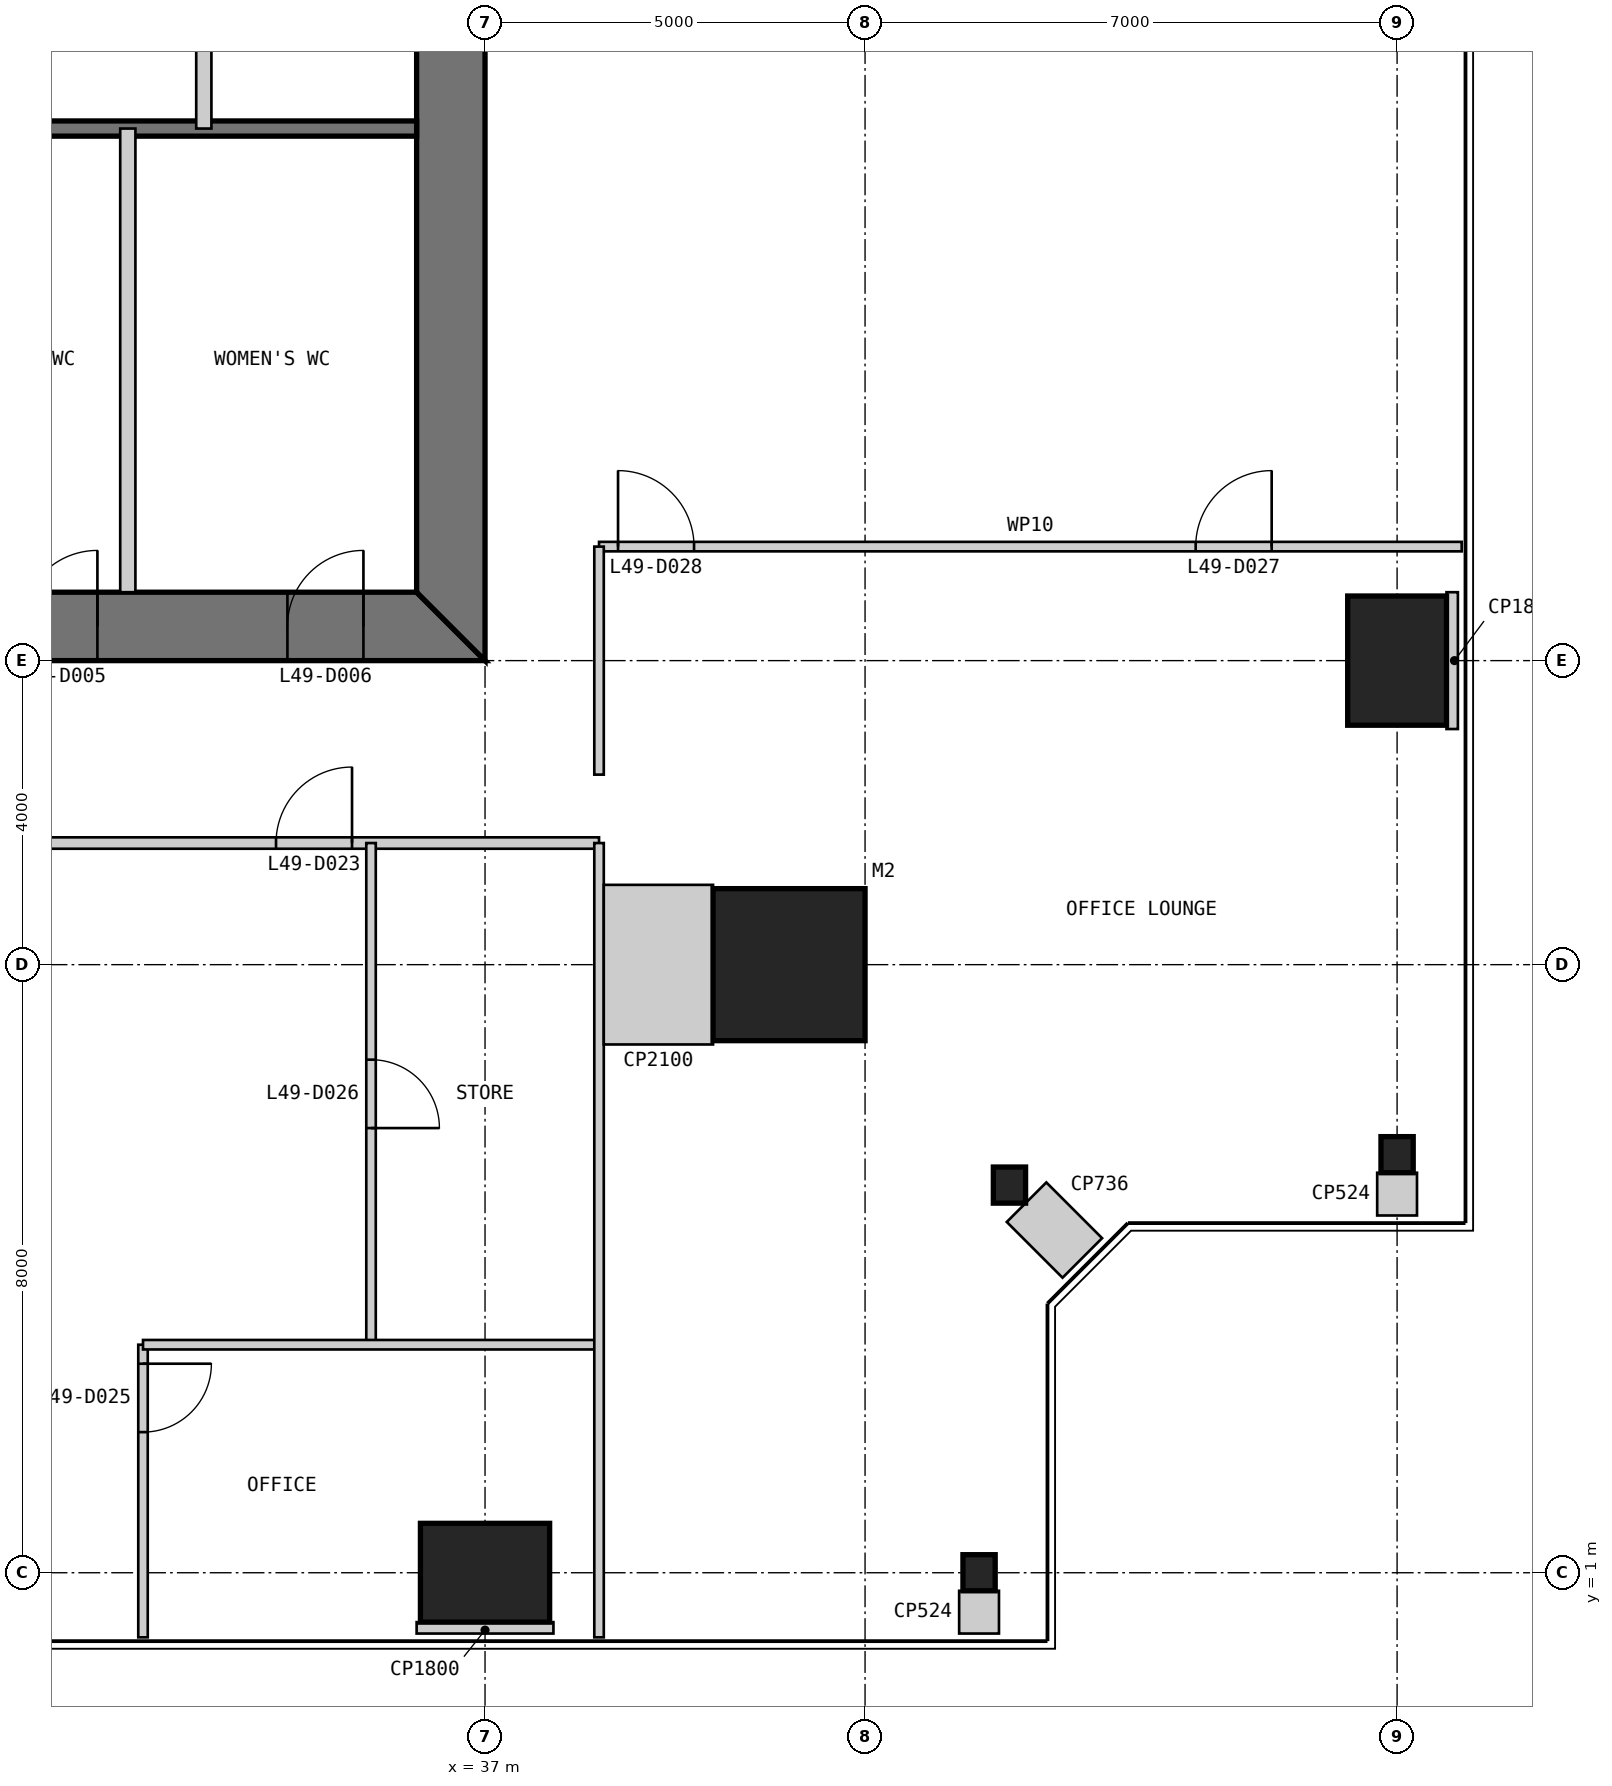
"""IFC4 building model, lengths in metres.
Left out: names, types, materials, properties, quantities, classifications, styles, units other than length and angle.
Written with IfcOpenShell. Run it as: python <this file> out.ifc"""

import sys

from ifc_helpers import new_model, si_unit, direction, frame, frame_2d, origin, origin_2d, place, context, subcontext, project, spatial, polyline, rectangle, i_section, outline, extrude, element, fill, save


model = new_model("IFC4")
c1 = context("Model", 3, precision=1e-05, world=origin(), true_north=direction((0.0, 1.0)))
c2 = subcontext(c1, "Body", "Model", "MODEL_VIEW")
j1 = project(units=[si_unit("LENGTHUNIT", "METRE"), si_unit("PLANEANGLEUNIT", "RADIAN")], contexts=[c1])
p1 = place(None, origin())
s1 = spatial("IfcSite", under=j1, at=p1, CompositionType="ELEMENT")
p2 = place(p1, origin())
s2 = spatial("IfcBuilding", under=s1, at=p2, CompositionType="ELEMENT")
p3 = place(p2, frame((0.0, 0.0, 209.8)))
s3 = spatial("IfcBuildingStorey", under=s2, at=p3, CompositionType="ELEMENT", Elevation=209.8)
p4 = place(p3, frame((41.0, 9.0, 0.0), z_axis=(0.0, 0.0, 1.0), x_axis=(1.0, 0.0, 0.0)))
e1 = element("IfcColumn", 1, at=p4, inside=s3, PredefinedType="COLUMN", context=c2, shape_type="SweptSolid", body=[
    extrude(rectangle(XDim=2.0, YDim=2.0, at=origin_2d()), origin(), (0.0, 0.0, 1.0), 4.0),
])
p5 = place(p3, frame((37.0, 1.0, 0.0), z_axis=(0.0, 0.0, 1.0), x_axis=(1.0, 0.0, 0.0)))
e2 = element("IfcColumn", 2, at=p5, inside=s3, PredefinedType="COLUMN", context=c2, shape_type="SweptSolid", body=[
    extrude(rectangle(XDim=1.7, YDim=1.3, at=origin_2d()), origin(), (0.0, 0.0, 1.0), 4.0),
])
for number, where, z_axis, x_axis in (
    (3, (43.5, 1.0, 0.0), (0.0, 0.0, 1.0), (1.0, 0.0, 0.0)),
    (4, (43.9, 6.1, 0.0), (0.0, 0.0, 1.0), (1.0, 0.0, 0.0)),
    (5, (49.0, 6.5, 0.0), (0.0, 0.0, 1.0), (1.0, 0.0, 0.0)),
):
    element("IfcColumn", number, at=place(p3, frame(where, z_axis=z_axis, x_axis=x_axis)), inside=s3, PredefinedType="COLUMN", context=c2, shape_type="SweptSolid", body=[
        extrude(i_section(OverallWidth=0.424, OverallDepth=0.475, WebThickness=0.048, FlangeThickness=0.077, at=origin_2d()), origin(), (0.0, 0.0, 1.0), 4.0),
    ])
p6 = place(p3, frame((49.0, 13.0, 0.0), z_axis=(0.0, 0.0, 1.0), x_axis=(1.0, 0.0, 0.0)))
e6 = element("IfcColumn", 6, at=p6, inside=s3, PredefinedType="COLUMN", context=c2, shape_type="SweptSolid", body=[
    extrude(rectangle(XDim=1.3, YDim=1.7, at=origin_2d()), origin(), (0.0, 0.0, 1.0), 4.0),
])
p7 = place(p3, frame((13.0, 13.45, 0.0), z_axis=(0.0, 0.0, 1.0), x_axis=(1.0, 0.0, 0.0)))
e7 = element("IfcWall", 7, at=p7, inside=s3, PredefinedType="SHEAR", context=c2, shape_type="SweptSolid", body=[
    extrude(outline(polyline([(0.0, -0.45), (24.0, -0.45), (23.1, 0.45), (0.9, 0.45), (0.0, -0.45)])), origin(), (0.0, 0.0, 1.0), 4.0),
])
p8 = place(p7, frame((4.9, 0.0, 0.0)))
e8 = element("IfcOpeningElement", 8, at=p8, cuts=e7, PredefinedType="OPENING", context=c2, shape_type="SweptSolid", body=[
    extrude(rectangle(XDim=1.0, YDim=2.2, at=frame_2d((0.5, 1.1))), frame((0.0, 0.46, 0.0), z_axis=(0.0, -1.0, 0.0), x_axis=(1.0, 0.0, 0.0)), (0.0, 0.0, 1.0), 0.92),
])
p9 = place(p7, frame((8.9, 0.0, 0.0)))
e9 = element("IfcOpeningElement", 9, at=p9, cuts=e7, PredefinedType="OPENING", context=c2, shape_type="SweptSolid", body=[
    extrude(rectangle(XDim=1.1, YDim=2.2, at=frame_2d((0.55, 1.1))), frame((0.0, 0.46, 0.0), z_axis=(0.0, -1.0, 0.0), x_axis=(1.0, 0.0, 0.0)), (0.0, 0.0, 1.0), 0.92),
])
p10 = place(p7, frame((15.05, 0.0, 0.0)))
e10 = element("IfcOpeningElement", 10, at=p10, cuts=e7, PredefinedType="OPENING", context=c2, shape_type="SweptSolid", body=[
    extrude(rectangle(XDim=0.9, YDim=2.2, at=frame_2d((0.45, 1.1))), frame((0.0, 0.46, 0.0), z_axis=(0.0, -1.0, 0.0), x_axis=(1.0, 0.0, 0.0)), (0.0, 0.0, 1.0), 0.92),
])
p11 = place(p7, frame((17.9, 0.0, 0.0)))
e11 = element("IfcOpeningElement", 11, at=p11, cuts=e7, PredefinedType="OPENING", context=c2, shape_type="SweptSolid", body=[
    extrude(rectangle(XDim=1.0, YDim=2.2, at=frame_2d((0.5, 1.1))), frame((0.0, 0.46, 0.0), z_axis=(0.0, -1.0, 0.0), x_axis=(1.0, 0.0, 0.0)), (0.0, 0.0, 1.0), 0.92),
])
p12 = place(p7, frame((21.4, 0.0, 0.0)))
e12 = element("IfcOpeningElement", 12, at=p12, cuts=e7, PredefinedType="OPENING", context=c2, shape_type="SweptSolid", body=[
    extrude(rectangle(XDim=1.0, YDim=2.2, at=frame_2d((0.5, 1.1))), frame((0.0, 0.46, 0.0), z_axis=(0.0, -1.0, 0.0), x_axis=(1.0, 0.0, 0.0)), (0.0, 0.0, 1.0), 0.92),
])
p13 = place(p3, frame((36.55, 13.9, 0.0), z_axis=(0.0, 0.0, 1.0), x_axis=(0.0, 1.0, 0.0)))
e13 = element("IfcWall", 13, at=p13, inside=s3, PredefinedType="SHEAR", context=c2, shape_type="SweptSolid", body=[
    extrude(outline(polyline([(-0.9, -0.45), (23.1, -0.45), (22.2, 0.45), (0.0, 0.45), (-0.9, -0.45)])), origin(), (0.0, 0.0, 1.0), 4.0),
])
p14 = place(p13, frame((20.2, 0.0, 0.0)))
e14 = element("IfcOpeningElement", 14, at=p14, cuts=e13, PredefinedType="OPENING", context=c2, shape_type="SweptSolid", body=[
    extrude(rectangle(XDim=1.0, YDim=2.2, at=frame_2d((0.5, 1.1))), frame((0.0, 0.46, 0.0), z_axis=(0.0, -1.0, 0.0), x_axis=(1.0, 0.0, 0.0)), (0.0, 0.0, 1.0), 0.92),
])
p15 = place(p13, frame((17.25, 0.0, 0.0)))
e15 = element("IfcOpeningElement", 15, at=p15, cuts=e13, PredefinedType="OPENING", context=c2, shape_type="SweptSolid", body=[
    extrude(rectangle(XDim=0.9, YDim=2.2, at=frame_2d((0.45, 1.1))), frame((0.0, 0.46, 0.0), z_axis=(0.0, -1.0, 0.0), x_axis=(1.0, 0.0, 0.0)), (0.0, 0.0, 1.0), 0.92),
])
p16 = place(p3, frame((20.3, 20.0, 0.0), z_axis=(0.0, 0.0, 1.0), x_axis=(1.0, 0.0, 0.0)))
e16 = element("IfcWall", 16, at=p16, inside=s3, PredefinedType="SOLIDWALL", context=c2, shape_type="SweptSolid", body=[
    extrude(rectangle(XDim=15.8, YDim=0.2, at=frame_2d((7.9, 0.0))), origin(), (0.0, 0.0, 1.0), 3.8),
])
p17 = place(p3, frame((32.3, 13.9, 0.0), z_axis=(0.0, 0.0, 1.0), x_axis=(0.0, 1.0, 0.0)))
e17 = element("IfcWall", 17, at=p17, inside=s3, PredefinedType="PARTITIONING", context=c2, shape_type="SweptSolid", body=[
    extrude(rectangle(XDim=6.1, YDim=0.2, at=frame_2d((3.05, 0.0))), origin(), (0.0, 0.0, 1.0), 3.8),
])
p18 = place(p3, frame((33.3, 36.1, 0.0), z_axis=(0.0, 0.0, 1.0), x_axis=(0.0, -1.0, 0.0)))
e18 = element("IfcWall", 18, at=p18, inside=s3, PredefinedType="PARTITIONING", context=c2, shape_type="SweptSolid", body=[
    extrude(rectangle(XDim=16.1, YDim=0.2, at=frame_2d((8.05, 0.0))), origin(), (0.0, 0.0, 1.0), 3.8),
])
p19 = place(p3, frame((11.5, 10.6, 0.0), z_axis=(0.0, 0.0, 1.0), x_axis=(1.0, 0.0, 0.0)))
e19 = element("IfcWall", 19, at=p19, inside=s3, PredefinedType="PARTITIONING", context=c2, shape_type="SweptSolid", body=[
    extrude(rectangle(XDim=27.0, YDim=0.15, at=frame_2d((13.5, 0.0))), origin(), (0.0, 0.0, 1.0), 3.85),
])
p20 = place(p19, frame((0.25, 0.0, 0.0)))
e20 = element("IfcOpeningElement", 20, at=p20, cuts=e19, PredefinedType="OPENING", context=c2, shape_type="SweptSolid", body=[
    extrude(rectangle(XDim=1.0, YDim=2.2, at=frame_2d((0.5, 1.1))), frame((0.0, 0.085, 0.0), z_axis=(0.0, -1.0, 0.0), x_axis=(1.0, 0.0, 0.0)), (0.0, 0.0, 1.0), 0.17),
])
p21 = place(p19, frame((22.75, 0.0, 0.0)))
e21 = element("IfcOpeningElement", 21, at=p21, cuts=e19, PredefinedType="OPENING", context=c2, shape_type="SweptSolid", body=[
    extrude(rectangle(XDim=1.0, YDim=2.2, at=frame_2d((0.5, 1.1))), frame((0.0, 0.085, 0.0), z_axis=(0.0, -1.0, 0.0), x_axis=(1.0, 0.0, 0.0)), (0.0, 0.0, 1.0), 0.17),
])
p22 = place(p3, frame((32.5, 0.15, 0.0), z_axis=(0.0, 0.0, 1.0), x_axis=(0.0, 1.0, 0.0)))
e22 = element("IfcWall", 22, at=p22, inside=s3, PredefinedType="PARTITIONING", context=c2, shape_type="SweptSolid", body=[
    extrude(rectangle(XDim=3.85, YDim=0.125, at=frame_2d((1.925, 0.0))), origin(), (0.0, 0.0, 1.0), 3.85),
])
p23 = place(p22, frame((2.7, 0.0, 0.0)))
e23 = element("IfcOpeningElement", 23, at=p23, cuts=e22, PredefinedType="OPENING", context=c2, shape_type="SweptSolid", body=[
    extrude(rectangle(XDim=0.9, YDim=2.2, at=frame_2d((0.45, 1.1))), frame((0.0, 0.073, 0.0), z_axis=(0.0, -1.0, 0.0), x_axis=(1.0, 0.0, 0.0)), (0.0, 0.0, 1.0), 0.145),
])
p24 = place(p3, frame((35.5, 4.0, 0.0), z_axis=(0.0, 0.0, 1.0), x_axis=(0.0, 1.0, 0.0)))
e24 = element("IfcWall", 24, at=p24, inside=s3, PredefinedType="PARTITIONING", context=c2, shape_type="SweptSolid", body=[
    extrude(rectangle(XDim=6.6, YDim=0.125, at=frame_2d((3.3, 0.0))), origin(), (0.0, 0.0, 1.0), 3.85),
])
p25 = place(p24, frame((2.85, 0.0, 0.0)))
e25 = element("IfcOpeningElement", 25, at=p25, cuts=e24, PredefinedType="OPENING", context=c2, shape_type="SweptSolid", body=[
    extrude(rectangle(XDim=0.9, YDim=2.2, at=frame_2d((0.45, 1.1))), frame((0.0, 0.073, 0.0), z_axis=(0.0, -1.0, 0.0), x_axis=(1.0, 0.0, 0.0)), (0.0, 0.0, 1.0), 0.145),
])
p26 = place(p3, frame((32.5, 4.0, 0.0), z_axis=(0.0, 0.0, 1.0), x_axis=(1.0, 0.0, 0.0)))
e26 = element("IfcWall", 26, at=p26, inside=s3, PredefinedType="PARTITIONING", context=c2, shape_type="SweptSolid", body=[
    extrude(rectangle(XDim=6.0, YDim=0.125, at=frame_2d((3.0, 0.0))), origin(), (0.0, 0.0, 1.0), 3.85),
])
p27 = place(p3, frame((38.5, 0.15, 0.0), z_axis=(0.0, 0.0, 1.0), x_axis=(0.0, 1.0, 0.0)))
e27 = element("IfcWall", 27, at=p27, inside=s3, PredefinedType="PARTITIONING", context=c2, shape_type="SweptSolid", body=[
    extrude(rectangle(XDim=10.45, YDim=0.125, at=frame_2d((5.225, 0.0))), origin(), (0.0, 0.0, 1.0), 3.85),
])
p28 = place(p3, frame((49.85, 14.5, 0.0), z_axis=(0.0, 0.0, 1.0), x_axis=(-1.0, 0.0, 0.0)))
e28 = element("IfcWall", 28, at=p28, inside=s3, PredefinedType="PARTITIONING", context=c2, shape_type="SweptSolid", body=[
    extrude(rectangle(XDim=11.35, YDim=0.125, at=frame_2d((5.675, 0.0))), origin(), (0.0, 0.0, 1.0), 3.85),
])
p29 = place(p28, frame((2.5, 0.0, 0.0)))
e29 = element("IfcOpeningElement", 29, at=p29, cuts=e28, PredefinedType="OPENING", context=c2, shape_type="SweptSolid", body=[
    extrude(rectangle(XDim=1.0, YDim=2.2, at=frame_2d((0.5, 1.1))), frame((0.0, 0.073, 0.0), z_axis=(0.0, -1.0, 0.0), x_axis=(1.0, 0.0, 0.0)), (0.0, 0.0, 1.0), 0.145),
])
p30 = place(p28, frame((10.1, 0.0, 0.0)))
e30 = element("IfcOpeningElement", 30, at=p30, cuts=e28, PredefinedType="OPENING", context=c2, shape_type="SweptSolid", body=[
    extrude(rectangle(XDim=1.0, YDim=2.2, at=frame_2d((0.5, 1.1))), frame((0.0, 0.073, 0.0), z_axis=(0.0, -1.0, 0.0), x_axis=(1.0, 0.0, 0.0)), (0.0, 0.0, 1.0), 0.145),
])
p31 = place(p3, frame((38.5, 11.5, 0.0), z_axis=(0.0, 0.0, 1.0), x_axis=(0.0, 1.0, 0.0)))
e31 = element("IfcWall", 31, at=p31, inside=s3, PredefinedType="PARTITIONING", context=c2, shape_type="SweptSolid", body=[
    extrude(rectangle(XDim=3.0, YDim=0.125, at=frame_2d((1.5, 0.0))), origin(), (0.0, 0.0, 1.0), 3.85),
])
p32 = place(p3, frame((37.0, 0.2, 0.0), z_axis=(0.0, 0.0, 1.0), x_axis=(0.0, 1.0, 0.0)))
e32 = element("IfcWall", 32, at=p32, inside=s3, PredefinedType="PARTITIONING", context=c2, shape_type="SweptSolid", body=[
    extrude(rectangle(XDim=0.15, YDim=1.8, at=frame_2d((0.075, 0.0))), origin(), (0.0, 0.0, 1.0), 3.85),
])
p33 = place(p3, frame((38.562, 9.0, 0.0), z_axis=(0.0, 0.0, 1.0), x_axis=(1.0, 0.0, 0.0)))
e33 = element("IfcWall", 33, at=p33, inside=s3, PredefinedType="PARTITIONING", context=c2, shape_type="SweptSolid", body=[
    extrude(rectangle(XDim=1.438, YDim=2.1, at=frame_2d((0.719, 0.0))), origin(), (0.0, 0.0, 1.0), 3.85),
])
p34 = place(p3, frame((43.5, 0.2, 0.0), z_axis=(0.0, 0.0, 1.0), x_axis=(0.0, 1.0, 0.0)))
e34 = element("IfcWall", 34, at=p34, inside=s3, PredefinedType="PARTITIONING", context=c2, shape_type="SweptSolid", body=[
    extrude(rectangle(XDim=0.562, YDim=0.524, at=frame_2d((0.281, 0.0))), origin(), (0.0, 0.0, 1.0), 3.85),
])
p35 = place(p3, frame((44.859, 5.141, 0.0), z_axis=(0.0, 0.0, 1.0), x_axis=(-0.707106781187, 0.707106781187, 0.0)))
e35 = element("IfcWall", 35, at=p35, inside=s3, PredefinedType="PARTITIONING", context=c2, shape_type="SweptSolid", body=[
    extrude(rectangle(XDim=1.038, YDim=0.736, at=frame_2d((0.519, 0.0))), origin(), (0.0, 0.0, 1.0), 3.85),
])
p36 = place(p3, frame((49.0, 5.7, 0.0), z_axis=(0.0, 0.0, 1.0), x_axis=(0.0, 1.0, 0.0)))
e36 = element("IfcWall", 36, at=p36, inside=s3, PredefinedType="PARTITIONING", context=c2, shape_type="SweptSolid", body=[
    extrude(rectangle(XDim=0.562, YDim=0.524, at=frame_2d((0.281, 0.0))), origin(), (0.0, 0.0, 1.0), 3.85),
])
p37 = place(p3, frame((49.8, 13.0, 0.0), z_axis=(0.0, 0.0, 1.0), x_axis=(-1.0, 0.0, 0.0)))
e37 = element("IfcWall", 37, at=p37, inside=s3, PredefinedType="PARTITIONING", context=c2, shape_type="SweptSolid", body=[
    extrude(rectangle(XDim=0.15, YDim=1.8, at=frame_2d((0.075, 0.0))), origin(), (0.0, 0.0, 1.0), 3.85),
])
p38 = place(p11, origin())
e38 = element("IfcDoor", 38, at=p38, inside=s3, OperationType="SINGLE_SWING_RIGHT", PredefinedType="DOOR", context=c2, shape_type="SweptSolid", body=[
    extrude(rectangle(XDim=1.0, YDim=2.2, at=frame_2d((0.5, 1.1))), frame((0.0, 0.025, 0.0), z_axis=(0.0, -1.0, 0.0), x_axis=(1.0, 0.0, 0.0)), (0.0, 0.0, 1.0), 0.05),
    extrude(outline(polyline([(0.0, 0.0), (0.04, 0.0), (0.04, 2.16), (0.96, 2.16), (0.96, 0.0), (1.0, 0.0), (1.0, 2.2), (0.0, 2.2), (0.0, 0.0)])), frame((0.0, 0.3, 0.0), z_axis=(0.0, -1.0, 0.0), x_axis=(1.0, 0.0, 0.0)), (0.0, 0.0, 1.0), 0.6),
])
fill(e11, e38)
p39 = place(p12, origin())
e39 = element("IfcDoor", 39, at=p39, inside=s3, OperationType="SINGLE_SWING_RIGHT", PredefinedType="DOOR", context=c2, shape_type="SweptSolid", body=[
    extrude(rectangle(XDim=1.0, YDim=2.2, at=frame_2d((0.5, 1.1))), frame((0.0, 0.025, 0.0), z_axis=(0.0, -1.0, 0.0), x_axis=(1.0, 0.0, 0.0)), (0.0, 0.0, 1.0), 0.05),
    extrude(outline(polyline([(0.0, 0.0), (0.04, 0.0), (0.04, 2.16), (0.96, 2.16), (0.96, 0.0), (1.0, 0.0), (1.0, 2.2), (0.0, 2.2), (0.0, 0.0)])), frame((0.0, 0.3, 0.0), z_axis=(0.0, -1.0, 0.0), x_axis=(1.0, 0.0, 0.0)), (0.0, 0.0, 1.0), 0.6),
])
fill(e12, e39)
p40 = place(p21, origin())
e40 = element("IfcDoor", 40, at=p40, inside=s3, OperationType="SINGLE_SWING_RIGHT", PredefinedType="DOOR", context=c2, shape_type="SweptSolid", body=[
    extrude(rectangle(XDim=1.0, YDim=2.2, at=frame_2d((0.5, 1.1))), frame((0.0, 0.025, 0.0), z_axis=(0.0, -1.0, 0.0), x_axis=(1.0, 0.0, 0.0)), (0.0, 0.0, 1.0), 0.05),
])
fill(e21, e40)
p41 = place(p23, frame((0.9, 0.0, 0.0), z_axis=(0.0, 0.0, 1.0), x_axis=(-1.0, 0.0, 0.0)))
e41 = element("IfcDoor", 41, at=p41, inside=s3, OperationType="SINGLE_SWING_LEFT", PredefinedType="DOOR", context=c2, shape_type="SweptSolid", body=[
    extrude(rectangle(XDim=0.9, YDim=2.2, at=frame_2d((0.45, 1.1))), frame((0.0, 0.025, 0.0), z_axis=(0.0, -1.0, 0.0), x_axis=(1.0, 0.0, 0.0)), (0.0, 0.0, 1.0), 0.05),
])
fill(e23, e41)
p42 = place(p25, frame((0.9, 0.0, 0.0), z_axis=(0.0, 0.0, 1.0), x_axis=(-1.0, 0.0, 0.0)))
e42 = element("IfcDoor", 42, at=p42, inside=s3, OperationType="SINGLE_SWING_RIGHT", PredefinedType="DOOR", context=c2, shape_type="SweptSolid", body=[
    extrude(rectangle(XDim=0.9, YDim=2.2, at=frame_2d((0.45, 1.1))), frame((0.0, 0.025, 0.0), z_axis=(0.0, -1.0, 0.0), x_axis=(1.0, 0.0, 0.0)), (0.0, 0.0, 1.0), 0.05),
])
fill(e25, e42)
p43 = place(p29, frame((1.0, 0.0, 0.0), z_axis=(0.0, 0.0, 1.0), x_axis=(-1.0, 0.0, 0.0)))
e43 = element("IfcDoor", 43, at=p43, inside=s3, OperationType="SINGLE_SWING_RIGHT", PredefinedType="DOOR", context=c2, shape_type="SweptSolid", body=[
    extrude(rectangle(XDim=1.0, YDim=2.2, at=frame_2d((0.5, 1.1))), frame((0.0, 0.025, 0.0), z_axis=(0.0, -1.0, 0.0), x_axis=(1.0, 0.0, 0.0)), (0.0, 0.0, 1.0), 0.05),
])
fill(e29, e43)
p44 = place(p30, frame((1.0, 0.0, 0.0), z_axis=(0.0, 0.0, 1.0), x_axis=(-1.0, 0.0, 0.0)))
e44 = element("IfcDoor", 44, at=p44, inside=s3, OperationType="SINGLE_SWING_LEFT", PredefinedType="DOOR", context=c2, shape_type="SweptSolid", body=[
    extrude(rectangle(XDim=1.0, YDim=2.2, at=frame_2d((0.5, 1.1))), frame((0.0, 0.025, 0.0), z_axis=(0.0, -1.0, 0.0), x_axis=(1.0, 0.0, 0.0)), (0.0, 0.0, 1.0), 0.05),
])
fill(e30, e44)
save(model, sys.argv[1])
